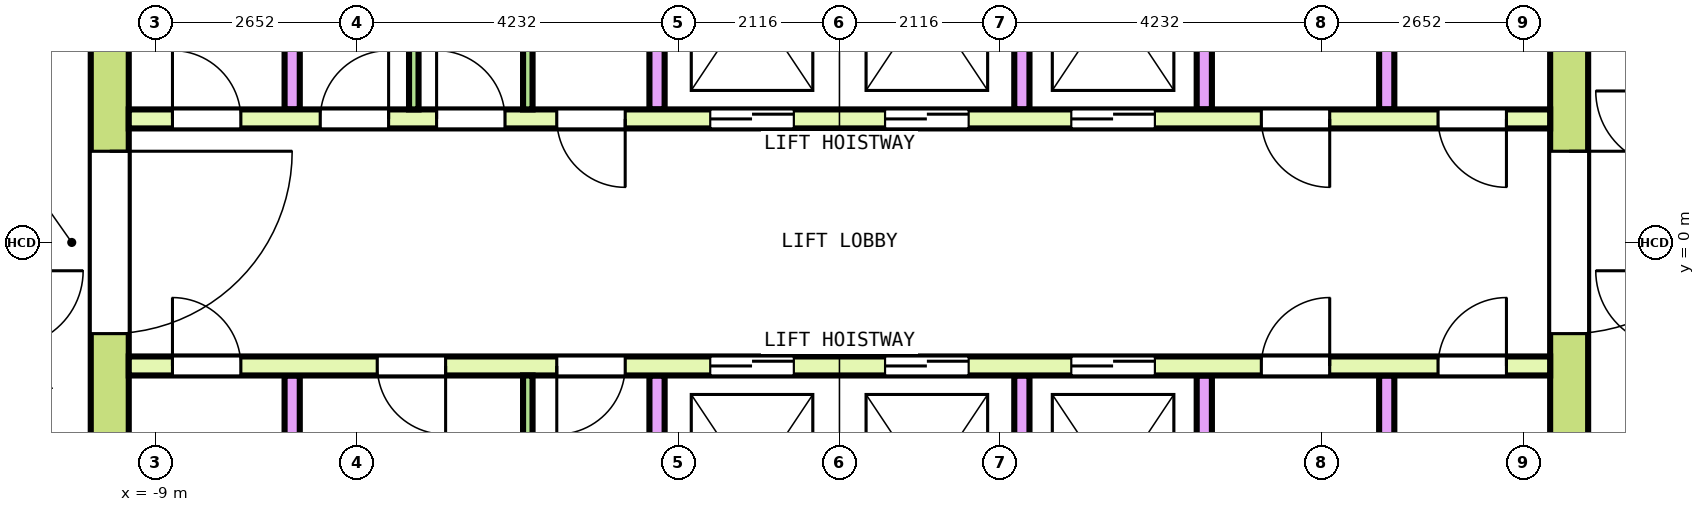
"""IFC4 building model, lengths in metres.
Left out: names, types, materials, properties, quantities, classifications, styles, units other than length and angle.
Written with IfcOpenShell. Run it as: python <this file> out.ifc"""

import sys

from ifc_helpers import new_model, si_unit, direction, frame, frame_2d, origin, place, context, subcontext, project, spatial, rectangle, extrude, element, fill, save


model = new_model("IFC4")
c1 = context("Model", 3, precision=1e-05, world=origin(), true_north=direction((0.0, 1.0)))
c2 = subcontext(c1, "Body", "Model", "MODEL_VIEW")
j1 = project(units=[si_unit("LENGTHUNIT", "METRE"), si_unit("PLANEANGLEUNIT", "RADIAN")], contexts=[c1])
p1 = place(None, origin())
s1 = spatial("IfcSite", under=j1, at=p1, CompositionType="ELEMENT")
p2 = place(p1, origin())
s2 = spatial("IfcBuilding", under=s1, at=p2, CompositionType="ELEMENT")
p3 = place(p2, frame((0.0, 0.0, 316.6)))
s3 = spatial("IfcBuildingStorey", under=s2, at=p3, CompositionType="ELEMENT", Elevation=316.6)
p4 = place(p3, frame((-9.6, -7.85, 0.0), z_axis=(0.0, 0.0, 1.0), x_axis=(0.0, 1.0, 0.0)))
e1 = element("IfcWall", 1, at=p4, inside=s3, PredefinedType="SHEAR", context=c2, shape_type="SweptSolid", body=[
    extrude(rectangle(XDim=15.7, YDim=0.5, at=frame_2d((7.85, 0.0))), origin(), (0.0, 0.0, 1.0), 3.7),
])
p5 = place(p4, frame((6.65, 0.0, 0.0)))
e2 = element("IfcOpeningElement", 2, at=p5, cuts=e1, PredefinedType="OPENING", context=c2, shape_type="SweptSolid", body=[
    extrude(rectangle(XDim=2.4, YDim=2.1, at=frame_2d((1.2, 1.05))), frame((0.0, 0.26, 0.0), z_axis=(0.0, -1.0, 0.0), x_axis=(1.0, 0.0, 0.0)), (0.0, 0.0, 1.0), 0.52),
])
p6 = place(p4, frame((13.55, 0.0, 0.0)))
e3 = element("IfcOpeningElement", 3, at=p6, cuts=e1, PredefinedType="OPENING", context=c2, shape_type="SweptSolid", body=[
    extrude(rectangle(XDim=1.2, YDim=2.1, at=frame_2d((0.6, 1.05))), frame((0.0, 0.26, 0.0), z_axis=(0.0, -1.0, 0.0), x_axis=(1.0, 0.0, 0.0)), (0.0, 0.0, 1.0), 0.52),
])
p7 = place(p4, frame((0.95, 0.0, 0.0)))
e4 = element("IfcOpeningElement", 4, at=p7, cuts=e1, PredefinedType="OPENING", context=c2, shape_type="SweptSolid", body=[
    extrude(rectangle(XDim=1.2, YDim=2.1, at=frame_2d((0.6, 1.05))), frame((0.0, 0.26, 0.0), z_axis=(0.0, -1.0, 0.0), x_axis=(1.0, 0.0, 0.0)), (0.0, 0.0, 1.0), 0.52),
])
p8 = place(p3, frame((9.6, -7.85, 0.0), z_axis=(0.0, 0.0, 1.0), x_axis=(0.0, 1.0, 0.0)))
e5 = element("IfcWall", 5, at=p8, inside=s3, PredefinedType="SHEAR", context=c2, shape_type="SweptSolid", body=[
    extrude(rectangle(XDim=15.7, YDim=0.5, at=frame_2d((7.85, 0.0))), origin(), (0.0, 0.0, 1.0), 3.7),
])
p9 = place(p8, frame((6.65, 0.0, 0.0)))
e6 = element("IfcOpeningElement", 6, at=p9, cuts=e5, PredefinedType="OPENING", context=c2, shape_type="SweptSolid", body=[
    extrude(rectangle(XDim=2.4, YDim=2.1, at=frame_2d((1.2, 1.05))), frame((0.0, 0.26, 0.0), z_axis=(0.0, -1.0, 0.0), x_axis=(1.0, 0.0, 0.0)), (0.0, 0.0, 1.0), 0.52),
])
p10 = place(p8, frame((13.55, 0.0, 0.0)))
e7 = element("IfcOpeningElement", 7, at=p10, cuts=e5, PredefinedType="OPENING", context=c2, shape_type="SweptSolid", body=[
    extrude(rectangle(XDim=1.2, YDim=2.1, at=frame_2d((0.6, 1.05))), frame((0.0, 0.26, 0.0), z_axis=(0.0, -1.0, 0.0), x_axis=(1.0, 0.0, 0.0)), (0.0, 0.0, 1.0), 0.52),
])
p11 = place(p8, frame((1.05, 0.0, 0.0)))
e8 = element("IfcOpeningElement", 8, at=p11, cuts=e5, PredefinedType="OPENING", context=c2, shape_type="SweptSolid", body=[
    extrude(rectangle(XDim=1.0, YDim=2.1, at=frame_2d((0.5, 1.05))), frame((0.0, 0.26, 0.0), z_axis=(0.0, -1.0, 0.0), x_axis=(1.0, 0.0, 0.0)), (0.0, 0.0, 1.0), 0.52),
])
p12 = place(p3, frame((-9.35, 1.625, 0.0), z_axis=(0.0, 0.0, 1.0), x_axis=(1.0, 0.0, 0.0)))
e9 = element("IfcWall", 9, at=p12, inside=s3, PredefinedType="SOLIDWALL", context=c2, shape_type="SweptSolid", body=[
    extrude(rectangle(XDim=18.7, YDim=0.25, at=frame_2d((9.35, 0.0))), origin(), (0.0, 0.0, 1.0), 3.7),
])
p13 = place(p12, frame((7.65, 0.0, 0.0)))
e10 = element("IfcOpeningElement", 10, at=p13, cuts=e9, PredefinedType="OPENING", context=c2, shape_type="SweptSolid", body=[
    extrude(rectangle(XDim=1.1, YDim=2.1, at=frame_2d((0.55, 1.05))), frame((0.0, 0.135, 0.0), z_axis=(0.0, -1.0, 0.0), x_axis=(1.0, 0.0, 0.0)), (0.0, 0.0, 1.0), 0.27),
])
p14 = place(p12, frame((9.95, 0.0, 0.0)))
e11 = element("IfcOpeningElement", 11, at=p14, cuts=e9, PredefinedType="OPENING", context=c2, shape_type="SweptSolid", body=[
    extrude(rectangle(XDim=1.1, YDim=2.1, at=frame_2d((0.55, 1.05))), frame((0.0, 0.135, 0.0), z_axis=(0.0, -1.0, 0.0), x_axis=(1.0, 0.0, 0.0)), (0.0, 0.0, 1.0), 0.27),
])
p15 = place(p12, frame((12.4, 0.0, 0.0)))
e12 = element("IfcOpeningElement", 12, at=p15, cuts=e9, PredefinedType="OPENING", context=c2, shape_type="SweptSolid", body=[
    extrude(rectangle(XDim=1.1, YDim=2.1, at=frame_2d((0.55, 1.05))), frame((0.0, 0.135, 0.0), z_axis=(0.0, -1.0, 0.0), x_axis=(1.0, 0.0, 0.0)), (0.0, 0.0, 1.0), 0.27),
])
p16 = place(p12, frame((0.575, 0.0, 0.0)))
e13 = element("IfcOpeningElement", 13, at=p16, cuts=e9, PredefinedType="OPENING", context=c2, shape_type="SweptSolid", body=[
    extrude(rectangle(XDim=0.9, YDim=2.1, at=frame_2d((0.45, 1.05))), frame((0.0, 0.135, 0.0), z_axis=(0.0, -1.0, 0.0), x_axis=(1.0, 0.0, 0.0)), (0.0, 0.0, 1.0), 0.27),
])
p17 = place(p12, frame((2.519, 0.0, 0.0)))
e14 = element("IfcOpeningElement", 14, at=p17, cuts=e9, PredefinedType="OPENING", context=c2, shape_type="SweptSolid", body=[
    extrude(rectangle(XDim=0.9, YDim=2.1, at=frame_2d((0.45, 1.05))), frame((0.0, 0.135, 0.0), z_axis=(0.0, -1.0, 0.0), x_axis=(1.0, 0.0, 0.0)), (0.0, 0.0, 1.0), 0.27),
])
p18 = place(p12, frame((4.05, 0.0, 0.0)))
e15 = element("IfcOpeningElement", 15, at=p18, cuts=e9, PredefinedType="OPENING", context=c2, shape_type="SweptSolid", body=[
    extrude(rectangle(XDim=0.9, YDim=2.1, at=frame_2d((0.45, 1.05))), frame((0.0, 0.135, 0.0), z_axis=(0.0, -1.0, 0.0), x_axis=(1.0, 0.0, 0.0)), (0.0, 0.0, 1.0), 0.27),
])
p19 = place(p12, frame((5.631, 0.0, 0.0)))
e16 = element("IfcOpeningElement", 16, at=p19, cuts=e9, PredefinedType="OPENING", context=c2, shape_type="SweptSolid", body=[
    extrude(rectangle(XDim=0.9, YDim=2.1, at=frame_2d((0.45, 1.05))), frame((0.0, 0.135, 0.0), z_axis=(0.0, -1.0, 0.0), x_axis=(1.0, 0.0, 0.0)), (0.0, 0.0, 1.0), 0.27),
])
p20 = place(p12, frame((14.9, 0.0, 0.0)))
e17 = element("IfcOpeningElement", 17, at=p20, cuts=e9, PredefinedType="OPENING", context=c2, shape_type="SweptSolid", body=[
    extrude(rectangle(XDim=0.9, YDim=2.1, at=frame_2d((0.45, 1.05))), frame((0.0, 0.135, 0.0), z_axis=(0.0, -1.0, 0.0), x_axis=(1.0, 0.0, 0.0)), (0.0, 0.0, 1.0), 0.27),
])
p21 = place(p12, frame((17.225, 0.0, 0.0)))
e18 = element("IfcOpeningElement", 18, at=p21, cuts=e9, PredefinedType="OPENING", context=c2, shape_type="SweptSolid", body=[
    extrude(rectangle(XDim=0.9, YDim=2.1, at=frame_2d((0.45, 1.05))), frame((0.0, 0.135, 0.0), z_axis=(0.0, -1.0, 0.0), x_axis=(1.0, 0.0, 0.0)), (0.0, 0.0, 1.0), 0.27),
])
for number, where, z_axis, x_axis in (
    (19, (-7.2, 1.75, 0.0), (0.0, 0.0, 1.0), (0.0, 1.0, 0.0)),
    (20, (-2.4, 1.75, 0.0), (0.0, 0.0, 1.0), (0.0, 1.0, 0.0)),
    (21, (2.4, 1.75, 0.0), (0.0, 0.0, 1.0), (0.0, 1.0, 0.0)),
    (22, (4.8, 1.75, 0.0), (0.0, 0.0, 1.0), (0.0, 1.0, 0.0)),
    (23, (7.2, 1.75, 0.0), (0.0, 0.0, 1.0), (0.0, 1.0, 0.0)),
):
    element("IfcWall", number, at=place(p3, frame(where, z_axis=z_axis, x_axis=x_axis)), inside=s3, PredefinedType="SOLIDWALL", context=c2, shape_type="SweptSolid", body=[
        extrude(rectangle(XDim=2.9, YDim=0.2, at=frame_2d((1.45, 0.0))), origin(), (0.0, 0.0, 1.0), 3.7),
    ])
p22 = place(p3, frame((-9.35, -1.625, 0.0), z_axis=(0.0, 0.0, 1.0), x_axis=(1.0, 0.0, 0.0)))
e24 = element("IfcWall", 24, at=p22, inside=s3, PredefinedType="SOLIDWALL", context=c2, shape_type="SweptSolid", body=[
    extrude(rectangle(XDim=18.7, YDim=0.25, at=frame_2d((9.35, 0.0))), origin(), (0.0, 0.0, 1.0), 3.7),
])
p23 = place(p22, frame((7.65, 0.0, 0.0)))
e25 = element("IfcOpeningElement", 25, at=p23, cuts=e24, PredefinedType="OPENING", context=c2, shape_type="SweptSolid", body=[
    extrude(rectangle(XDim=1.1, YDim=2.1, at=frame_2d((0.55, 1.05))), frame((0.0, 0.135, 0.0), z_axis=(0.0, -1.0, 0.0), x_axis=(1.0, 0.0, 0.0)), (0.0, 0.0, 1.0), 0.27),
])
p24 = place(p22, frame((9.95, 0.0, 0.0)))
e26 = element("IfcOpeningElement", 26, at=p24, cuts=e24, PredefinedType="OPENING", context=c2, shape_type="SweptSolid", body=[
    extrude(rectangle(XDim=1.1, YDim=2.1, at=frame_2d((0.55, 1.05))), frame((0.0, 0.135, 0.0), z_axis=(0.0, -1.0, 0.0), x_axis=(1.0, 0.0, 0.0)), (0.0, 0.0, 1.0), 0.27),
])
p25 = place(p22, frame((12.4, 0.0, 0.0)))
e27 = element("IfcOpeningElement", 27, at=p25, cuts=e24, PredefinedType="OPENING", context=c2, shape_type="SweptSolid", body=[
    extrude(rectangle(XDim=1.1, YDim=2.1, at=frame_2d((0.55, 1.05))), frame((0.0, 0.135, 0.0), z_axis=(0.0, -1.0, 0.0), x_axis=(1.0, 0.0, 0.0)), (0.0, 0.0, 1.0), 0.27),
])
p26 = place(p22, frame((0.575, 0.0, 0.0)))
e28 = element("IfcOpeningElement", 28, at=p26, cuts=e24, PredefinedType="OPENING", context=c2, shape_type="SweptSolid", body=[
    extrude(rectangle(XDim=0.9, YDim=2.1, at=frame_2d((0.45, 1.05))), frame((0.0, 0.135, 0.0), z_axis=(0.0, -1.0, 0.0), x_axis=(1.0, 0.0, 0.0)), (0.0, 0.0, 1.0), 0.27),
])
p27 = place(p22, frame((3.269, 0.0, 0.0)))
e29 = element("IfcOpeningElement", 29, at=p27, cuts=e24, PredefinedType="OPENING", context=c2, shape_type="SweptSolid", body=[
    extrude(rectangle(XDim=0.9, YDim=2.1, at=frame_2d((0.45, 1.05))), frame((0.0, 0.135, 0.0), z_axis=(0.0, -1.0, 0.0), x_axis=(1.0, 0.0, 0.0)), (0.0, 0.0, 1.0), 0.27),
])
p28 = place(p22, frame((5.631, 0.0, 0.0)))
e30 = element("IfcOpeningElement", 30, at=p28, cuts=e24, PredefinedType="OPENING", context=c2, shape_type="SweptSolid", body=[
    extrude(rectangle(XDim=0.9, YDim=2.1, at=frame_2d((0.45, 1.05))), frame((0.0, 0.135, 0.0), z_axis=(0.0, -1.0, 0.0), x_axis=(1.0, 0.0, 0.0)), (0.0, 0.0, 1.0), 0.27),
])
p29 = place(p22, frame((14.9, 0.0, 0.0)))
e31 = element("IfcOpeningElement", 31, at=p29, cuts=e24, PredefinedType="OPENING", context=c2, shape_type="SweptSolid", body=[
    extrude(rectangle(XDim=0.9, YDim=2.1, at=frame_2d((0.45, 1.05))), frame((0.0, 0.135, 0.0), z_axis=(0.0, -1.0, 0.0), x_axis=(1.0, 0.0, 0.0)), (0.0, 0.0, 1.0), 0.27),
])
p30 = place(p22, frame((17.225, 0.0, 0.0)))
e32 = element("IfcOpeningElement", 32, at=p30, cuts=e24, PredefinedType="OPENING", context=c2, shape_type="SweptSolid", body=[
    extrude(rectangle(XDim=0.9, YDim=2.1, at=frame_2d((0.45, 1.05))), frame((0.0, 0.135, 0.0), z_axis=(0.0, -1.0, 0.0), x_axis=(1.0, 0.0, 0.0)), (0.0, 0.0, 1.0), 0.27),
])
for number, where, z_axis, x_axis in (
    (33, (-7.2, -4.65, 0.0), (0.0, 0.0, 1.0), (0.0, 1.0, 0.0)),
    (34, (-2.4, -4.65, 0.0), (0.0, 0.0, 1.0), (0.0, 1.0, 0.0)),
    (35, (2.4, -4.65, 0.0), (0.0, 0.0, 1.0), (0.0, 1.0, 0.0)),
    (36, (4.8, -4.65, 0.0), (0.0, 0.0, 1.0), (0.0, 1.0, 0.0)),
    (37, (7.2, -4.65, 0.0), (0.0, 0.0, 1.0), (0.0, 1.0, 0.0)),
):
    element("IfcWall", number, at=place(p3, frame(where, z_axis=z_axis, x_axis=x_axis)), inside=s3, PredefinedType="SOLIDWALL", context=c2, shape_type="SweptSolid", body=[
        extrude(rectangle(XDim=2.9, YDim=0.2, at=frame_2d((1.45, 0.0))), origin(), (0.0, 0.0, 1.0), 3.7),
    ])
for number, where, z_axis, x_axis in (
    (38, (-5.6, 1.75, 0.0), (0.0, 0.0, 1.0), (0.0, 1.0, 0.0)),
    (39, (-4.1, 1.75, 0.0), (0.0, 0.0, 1.0), (0.0, 1.0, 0.0)),
    (40, (-4.1, -4.65, 0.0), (0.0, 0.0, 1.0), (0.0, 1.0, 0.0)),
):
    element("IfcWall", number, at=place(p3, frame(where, z_axis=z_axis, x_axis=x_axis)), inside=s3, PredefinedType="PARTITIONING", context=c2, shape_type="SweptSolid", body=[
        extrude(rectangle(XDim=2.9, YDim=0.125, at=frame_2d((1.45, 0.0))), origin(), (0.0, 0.0, 1.0), 3.7),
    ])
p31 = place(p13, origin())
e41 = element("IfcDoor", 41, at=p31, inside=s3, OperationType="DOUBLE_DOOR_SLIDING", PredefinedType="DOOR", context=c2, shape_type="SweptSolid", body=[
    extrude(rectangle(XDim=1.1, YDim=2.1, at=frame_2d((0.55, 1.05))), frame((0.0, 0.075, 0.0), z_axis=(0.0, -1.0, 0.0), x_axis=(1.0, 0.0, 0.0)), (0.0, 0.0, 1.0), 0.15),
])
fill(e10, e41)
p32 = place(p14, origin())
e42 = element("IfcDoor", 42, at=p32, inside=s3, OperationType="DOUBLE_DOOR_SLIDING", PredefinedType="DOOR", context=c2, shape_type="SweptSolid", body=[
    extrude(rectangle(XDim=1.1, YDim=2.1, at=frame_2d((0.55, 1.05))), frame((0.0, 0.075, 0.0), z_axis=(0.0, -1.0, 0.0), x_axis=(1.0, 0.0, 0.0)), (0.0, 0.0, 1.0), 0.15),
])
fill(e11, e42)
p33 = place(p15, origin())
e43 = element("IfcDoor", 43, at=p33, inside=s3, OperationType="DOUBLE_DOOR_SLIDING", PredefinedType="DOOR", context=c2, shape_type="SweptSolid", body=[
    extrude(rectangle(XDim=1.1, YDim=2.1, at=frame_2d((0.55, 1.05))), frame((0.0, 0.075, 0.0), z_axis=(0.0, -1.0, 0.0), x_axis=(1.0, 0.0, 0.0)), (0.0, 0.0, 1.0), 0.15),
])
fill(e12, e43)
p34 = place(p23, origin())
e44 = element("IfcDoor", 44, at=p34, inside=s3, OperationType="DOUBLE_DOOR_SLIDING", PredefinedType="DOOR", context=c2, shape_type="SweptSolid", body=[
    extrude(rectangle(XDim=1.1, YDim=2.1, at=frame_2d((0.55, 1.05))), frame((0.0, 0.075, 0.0), z_axis=(0.0, -1.0, 0.0), x_axis=(1.0, 0.0, 0.0)), (0.0, 0.0, 1.0), 0.15),
])
fill(e25, e44)
p35 = place(p24, origin())
e45 = element("IfcDoor", 45, at=p35, inside=s3, OperationType="DOUBLE_DOOR_SLIDING", PredefinedType="DOOR", context=c2, shape_type="SweptSolid", body=[
    extrude(rectangle(XDim=1.1, YDim=2.1, at=frame_2d((0.55, 1.05))), frame((0.0, 0.075, 0.0), z_axis=(0.0, -1.0, 0.0), x_axis=(1.0, 0.0, 0.0)), (0.0, 0.0, 1.0), 0.15),
])
fill(e26, e45)
p36 = place(p25, origin())
e46 = element("IfcDoor", 46, at=p36, inside=s3, OperationType="DOUBLE_DOOR_SLIDING", PredefinedType="DOOR", context=c2, shape_type="SweptSolid", body=[
    extrude(rectangle(XDim=1.1, YDim=2.1, at=frame_2d((0.55, 1.05))), frame((0.0, 0.075, 0.0), z_axis=(0.0, -1.0, 0.0), x_axis=(1.0, 0.0, 0.0)), (0.0, 0.0, 1.0), 0.15),
])
fill(e27, e46)
p37 = place(p5, origin())
e47 = element("IfcDoor", 47, at=p37, inside=s3, OperationType="DOUBLE_DOOR_SINGLE_SWING", PredefinedType="DOOR", context=c2, shape_type="SweptSolid", body=[
    extrude(rectangle(XDim=2.4, YDim=2.1, at=frame_2d((1.2, 1.05))), frame((0.0, 0.2, 0.0), z_axis=(0.0, -1.0, 0.0), x_axis=(1.0, 0.0, 0.0)), (0.0, 0.0, 1.0), 0.4),
])
fill(e2, e47)
p38 = place(p9, origin())
e48 = element("IfcDoor", 48, at=p38, inside=s3, OperationType="DOUBLE_DOOR_SINGLE_SWING", PredefinedType="DOOR", context=c2, shape_type="SweptSolid", body=[
    extrude(rectangle(XDim=2.4, YDim=2.1, at=frame_2d((1.2, 1.05))), frame((0.0, 0.2, 0.0), z_axis=(0.0, -1.0, 0.0), x_axis=(1.0, 0.0, 0.0)), (0.0, 0.0, 1.0), 0.4),
])
fill(e6, e48)
p39 = place(p16, origin())
e49 = element("IfcDoor", 49, at=p39, inside=s3, OperationType="SINGLE_SWING_LEFT", PredefinedType="DOOR", context=c2, shape_type="SweptSolid", body=[
    extrude(rectangle(XDim=0.9, YDim=2.1, at=frame_2d((0.45, 1.05))), frame((0.0, 0.075, 0.0), z_axis=(0.0, -1.0, 0.0), x_axis=(1.0, 0.0, 0.0)), (0.0, 0.0, 1.0), 0.15),
])
fill(e13, e49)
p40 = place(p17, origin())
e50 = element("IfcDoor", 50, at=p40, inside=s3, OperationType="SINGLE_SWING_RIGHT", PredefinedType="DOOR", context=c2, shape_type="SweptSolid", body=[
    extrude(rectangle(XDim=0.9, YDim=2.1, at=frame_2d((0.45, 1.05))), frame((0.0, 0.075, 0.0), z_axis=(0.0, -1.0, 0.0), x_axis=(1.0, 0.0, 0.0)), (0.0, 0.0, 1.0), 0.15),
])
fill(e14, e50)
p41 = place(p18, origin())
e51 = element("IfcDoor", 51, at=p41, inside=s3, OperationType="SINGLE_SWING_LEFT", PredefinedType="DOOR", context=c2, shape_type="SweptSolid", body=[
    extrude(rectangle(XDim=0.9, YDim=2.1, at=frame_2d((0.45, 1.05))), frame((0.0, 0.075, 0.0), z_axis=(0.0, -1.0, 0.0), x_axis=(1.0, 0.0, 0.0)), (0.0, 0.0, 1.0), 0.15),
])
fill(e15, e51)
p42 = place(p19, origin())
e52 = element("IfcDoor", 52, at=p42, inside=s3, OperationType="SINGLE_SWING_RIGHT", PredefinedType="DOOR", context=c2, shape_type="SweptSolid", body=[
    extrude(rectangle(XDim=0.9, YDim=2.1, at=frame_2d((0.45, 1.05))), frame((0.0, 0.075, 0.0), z_axis=(0.0, -1.0, 0.0), x_axis=(1.0, 0.0, 0.0)), (0.0, 0.0, 1.0), 0.15),
])
fill(e16, e52)
p43 = place(p20, origin())
e53 = element("IfcDoor", 53, at=p43, inside=s3, OperationType="SINGLE_SWING_LEFT", PredefinedType="DOOR", context=c2, shape_type="SweptSolid", body=[
    extrude(rectangle(XDim=0.9, YDim=2.1, at=frame_2d((0.45, 1.05))), frame((0.0, 0.075, 0.0), z_axis=(0.0, -1.0, 0.0), x_axis=(1.0, 0.0, 0.0)), (0.0, 0.0, 1.0), 0.15),
])
fill(e17, e53)
p44 = place(p21, origin())
e54 = element("IfcDoor", 54, at=p44, inside=s3, OperationType="SINGLE_SWING_RIGHT", PredefinedType="DOOR", context=c2, shape_type="SweptSolid", body=[
    extrude(rectangle(XDim=0.9, YDim=2.1, at=frame_2d((0.45, 1.05))), frame((0.0, 0.075, 0.0), z_axis=(0.0, -1.0, 0.0), x_axis=(1.0, 0.0, 0.0)), (0.0, 0.0, 1.0), 0.15),
])
fill(e18, e54)
p45 = place(p26, origin())
e55 = element("IfcDoor", 55, at=p45, inside=s3, OperationType="SINGLE_SWING_LEFT", PredefinedType="DOOR", context=c2, shape_type="SweptSolid", body=[
    extrude(rectangle(XDim=0.9, YDim=2.1, at=frame_2d((0.45, 1.05))), frame((0.0, 0.075, 0.0), z_axis=(0.0, -1.0, 0.0), x_axis=(1.0, 0.0, 0.0)), (0.0, 0.0, 1.0), 0.15),
])
fill(e28, e55)
p46 = place(p27, origin())
e56 = element("IfcDoor", 56, at=p46, inside=s3, OperationType="SINGLE_SWING_RIGHT", PredefinedType="DOOR", context=c2, shape_type="SweptSolid", body=[
    extrude(rectangle(XDim=0.9, YDim=2.1, at=frame_2d((0.45, 1.05))), frame((0.0, 0.075, 0.0), z_axis=(0.0, -1.0, 0.0), x_axis=(1.0, 0.0, 0.0)), (0.0, 0.0, 1.0), 0.15),
])
fill(e29, e56)
p47 = place(p28, origin())
e57 = element("IfcDoor", 57, at=p47, inside=s3, OperationType="SINGLE_SWING_LEFT", PredefinedType="DOOR", context=c2, shape_type="SweptSolid", body=[
    extrude(rectangle(XDim=0.9, YDim=2.1, at=frame_2d((0.45, 1.05))), frame((0.0, 0.075, 0.0), z_axis=(0.0, -1.0, 0.0), x_axis=(1.0, 0.0, 0.0)), (0.0, 0.0, 1.0), 0.15),
])
fill(e30, e57)
p48 = place(p29, origin())
e58 = element("IfcDoor", 58, at=p48, inside=s3, OperationType="SINGLE_SWING_RIGHT", PredefinedType="DOOR", context=c2, shape_type="SweptSolid", body=[
    extrude(rectangle(XDim=0.9, YDim=2.1, at=frame_2d((0.45, 1.05))), frame((0.0, 0.075, 0.0), z_axis=(0.0, -1.0, 0.0), x_axis=(1.0, 0.0, 0.0)), (0.0, 0.0, 1.0), 0.15),
])
fill(e31, e58)
p49 = place(p30, origin())
e59 = element("IfcDoor", 59, at=p49, inside=s3, OperationType="SINGLE_SWING_LEFT", PredefinedType="DOOR", context=c2, shape_type="SweptSolid", body=[
    extrude(rectangle(XDim=0.9, YDim=2.1, at=frame_2d((0.45, 1.05))), frame((0.0, 0.075, 0.0), z_axis=(0.0, -1.0, 0.0), x_axis=(1.0, 0.0, 0.0)), (0.0, 0.0, 1.0), 0.15),
])
fill(e32, e59)
save(model, sys.argv[1])
